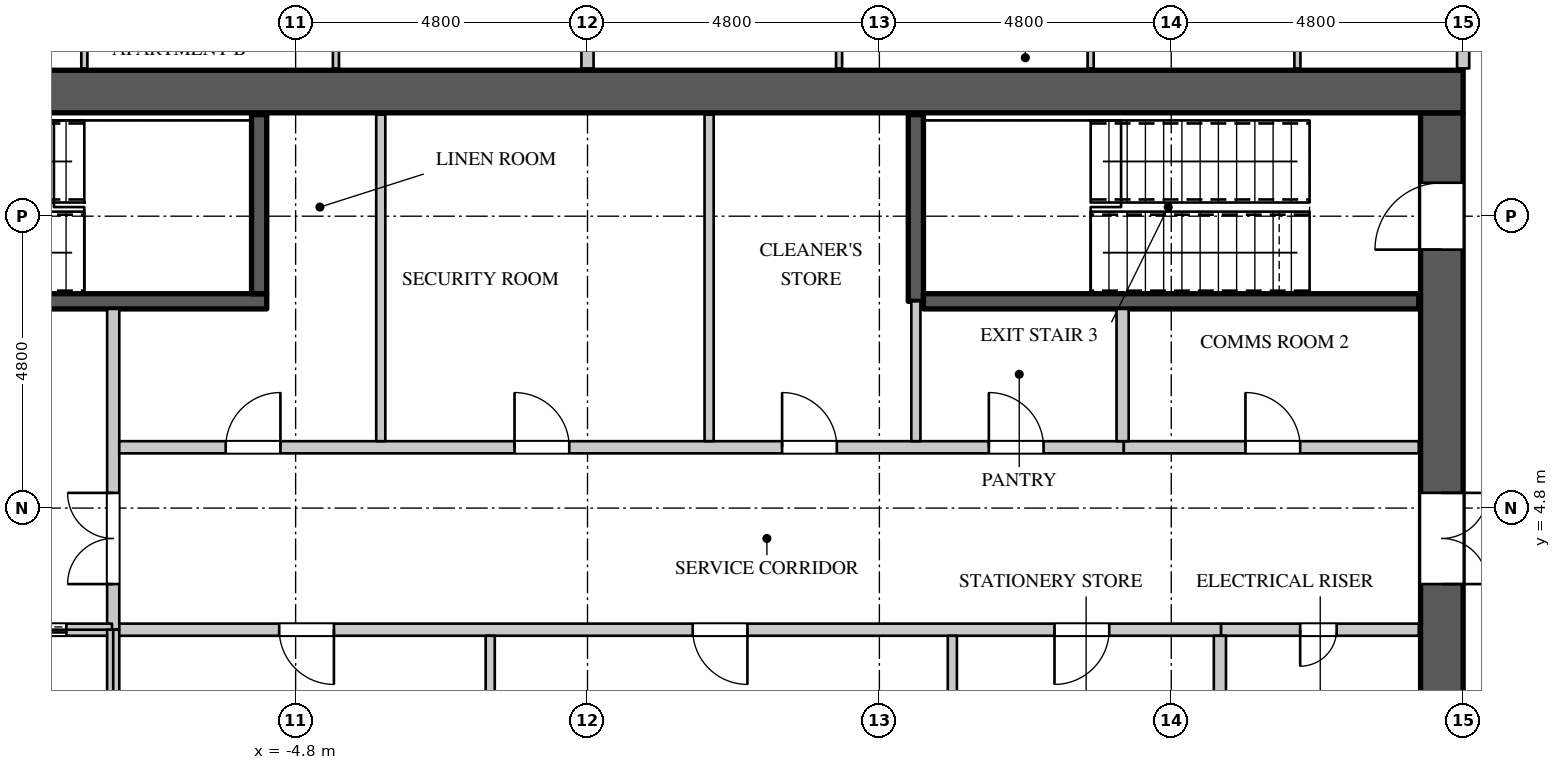
"""IFC4 building model, lengths in metres.
Left out: names, types, materials, properties, quantities, classifications, styles, units other than length and angle.
Written with IfcOpenShell. Run it as: python <this file> out.ifc"""

import sys

from ifc_helpers import new_model, si_unit, direction, frame, frame_2d, origin, place, context, subcontext, project, spatial, rectangle, extrude, element, fill, save


model = new_model("IFC4")
c1 = context("Model", 3, precision=1e-05, world=origin(), true_north=direction((0.0, 1.0)))
c2 = subcontext(c1, "Body", "Model", "MODEL_VIEW")
j1 = project(units=[si_unit("LENGTHUNIT", "METRE"), si_unit("PLANEANGLEUNIT", "RADIAN")], contexts=[c1])
p1 = place(None, origin())
s1 = spatial("IfcSite", under=j1, at=p1, CompositionType="ELEMENT")
p2 = place(p1, origin())
s2 = spatial("IfcBuilding", under=s1, at=p2, CompositionType="ELEMENT")
p3 = place(p2, frame((0.0, 0.0, 162.3)))
s3 = spatial("IfcBuildingStorey", under=s2, at=p3, CompositionType="ELEMENT", Elevation=162.3)
p4 = place(p3, frame((-14.4, 11.65, 0.0), z_axis=(0.0, 0.0, 1.0), x_axis=(1.0, 0.0, 0.0)))
e1 = element("IfcWall", 1, at=p4, inside=s3, PredefinedType="SHEAR", context=c2, shape_type="SweptSolid", body=[
    extrude(rectangle(XDim=28.8, YDim=0.7, at=frame_2d((14.4, 0.0))), origin(), (0.0, 0.0, 1.0), 4.2),
])
p5 = place(p3, frame((14.05, -11.3, 0.0), z_axis=(0.0, 0.0, 1.0), x_axis=(0.0, 1.0, 0.0)))
e2 = element("IfcWall", 2, at=p5, inside=s3, PredefinedType="SHEAR", context=c2, shape_type="SweptSolid", body=[
    extrude(rectangle(XDim=22.6, YDim=0.7, at=frame_2d((11.3, 0.0))), origin(), (0.0, 0.0, 1.0), 4.2),
])
p6 = place(p5, frame((20.35, 0.0, 0.0)))
e3 = element("IfcOpeningElement", 3, at=p6, cuts=e2, PredefinedType="OPENING", context=c2, shape_type="SweptSolid", body=[
    extrude(rectangle(XDim=1.1, YDim=2.2, at=frame_2d((0.55, 1.1))), frame((0.0, 0.36, 0.0), z_axis=(0.0, -1.0, 0.0), x_axis=(1.0, 0.0, 0.0)), (0.0, 0.0, 1.0), 0.72),
])
p7 = place(p5, frame((1.15, 0.0, 0.0)))
e4 = element("IfcOpeningElement", 4, at=p7, cuts=e2, PredefinedType="OPENING", context=c2, shape_type="SweptSolid", body=[
    extrude(rectangle(XDim=1.1, YDim=2.2, at=frame_2d((0.55, 1.1))), frame((0.0, 0.36, 0.0), z_axis=(0.0, -1.0, 0.0), x_axis=(1.0, 0.0, 0.0)), (0.0, 0.0, 1.0), 0.72),
])
p8 = place(p5, frame((14.85, 0.0, 0.0)))
e5 = element("IfcOpeningElement", 5, at=p8, cuts=e2, PredefinedType="OPENING", context=c2, shape_type="SweptSolid", body=[
    extrude(rectangle(XDim=1.5, YDim=2.4, at=frame_2d((0.75, 1.2))), frame((0.0, 0.36, 0.0), z_axis=(0.0, -1.0, 0.0), x_axis=(1.0, 0.0, 0.0)), (0.0, 0.0, 1.0), 0.72),
])
p9 = place(p5, frame((6.25, 0.0, 0.0)))
e6 = element("IfcOpeningElement", 6, at=p9, cuts=e2, PredefinedType="OPENING", context=c2, shape_type="SweptSolid", body=[
    extrude(rectangle(XDim=1.5, YDim=2.4, at=frame_2d((0.75, 1.2))), frame((0.0, 0.36, 0.0), z_axis=(0.0, -1.0, 0.0), x_axis=(1.0, 0.0, 0.0)), (0.0, 0.0, 1.0), 0.72),
])
p10 = place(p3, frame((-7.82, 2.8, 0.0), z_axis=(0.0, 0.0, 1.0), x_axis=(1.0, 0.0, 0.0)))
e7 = element("IfcWall", 7, at=p10, inside=s3, PredefinedType="PARTITIONING", context=c2, shape_type="SweptSolid", body=[
    extrude(rectangle(XDim=18.24, YDim=0.2, at=frame_2d((9.12, 0.0))), origin(), (0.0, 0.0, 1.0), 3.95),
])
p11 = place(p10, frame((2.75, 0.0, 0.0)))
e8 = element("IfcOpeningElement", 8, at=p11, cuts=e7, PredefinedType="OPENING", context=c2, shape_type="SweptSolid", body=[
    extrude(rectangle(XDim=0.9, YDim=2.2, at=frame_2d((0.45, 1.1))), frame((0.0, 0.11, 0.0), z_axis=(0.0, -1.0, 0.0), x_axis=(1.0, 0.0, 0.0)), (0.0, 0.0, 1.0), 0.22),
])
p12 = place(p10, frame((9.55, 0.0, 0.0)))
e9 = element("IfcOpeningElement", 9, at=p12, cuts=e7, PredefinedType="OPENING", context=c2, shape_type="SweptSolid", body=[
    extrude(rectangle(XDim=0.9, YDim=2.2, at=frame_2d((0.45, 1.1))), frame((0.0, 0.11, 0.0), z_axis=(0.0, -1.0, 0.0), x_axis=(1.0, 0.0, 0.0)), (0.0, 0.0, 1.0), 0.22),
])
p13 = place(p10, frame((15.5, 0.0, 0.0)))
e10 = element("IfcOpeningElement", 10, at=p13, cuts=e7, PredefinedType="OPENING", context=c2, shape_type="SweptSolid", body=[
    extrude(rectangle(XDim=0.9, YDim=2.2, at=frame_2d((0.45, 1.1))), frame((0.0, 0.11, 0.0), z_axis=(0.0, -1.0, 0.0), x_axis=(1.0, 0.0, 0.0)), (0.0, 0.0, 1.0), 0.22),
])
p14 = place(p3, frame((-7.8, 2.8, 0.0), z_axis=(0.0, 0.0, 1.0), x_axis=(0.0, 1.0, 0.0)))
e11 = element("IfcWall", 11, at=p14, inside=s3, PredefinedType="PARTITIONING", context=c2, shape_type="SweptSolid", body=[
    extrude(rectangle(XDim=5.275, YDim=0.2, at=frame_2d((2.637, 0.0))), origin(), (0.0, 0.0, 1.0), 3.95),
])
p15 = place(p14, frame((0.75, 0.0, 0.0)))
e12 = element("IfcOpeningElement", 12, at=p15, cuts=e11, PredefinedType="OPENING", context=c2, shape_type="SweptSolid", body=[
    extrude(rectangle(XDim=1.5, YDim=2.4, at=frame_2d((0.75, 1.2))), frame((0.0, 0.11, 0.0), z_axis=(0.0, -1.0, 0.0), x_axis=(1.0, 0.0, 0.0)), (0.0, 0.0, 1.0), 0.22),
])
p16 = place(p3, frame((-7.7, 5.8, 0.0), z_axis=(0.0, 0.0, 1.0), x_axis=(1.0, 0.0, 0.0)))
e13 = element("IfcWall", 13, at=p16, inside=s3, PredefinedType="PARTITIONING", context=c2, shape_type="SweptSolid", body=[
    extrude(rectangle(XDim=16.52, YDim=0.2, at=frame_2d((8.26, 0.0))), origin(), (0.0, 0.0, 1.0), 3.95),
])
p17 = place(p16, frame((1.75, 0.0, 0.0)))
e14 = element("IfcOpeningElement", 14, at=p17, cuts=e13, PredefinedType="OPENING", context=c2, shape_type="SweptSolid", body=[
    extrude(rectangle(XDim=0.9, YDim=2.2, at=frame_2d((0.45, 1.1))), frame((0.0, 0.11, 0.0), z_axis=(0.0, -1.0, 0.0), x_axis=(1.0, 0.0, 0.0)), (0.0, 0.0, 1.0), 0.22),
])
p18 = place(p16, frame((6.5, 0.0, 0.0)))
e15 = element("IfcOpeningElement", 15, at=p18, cuts=e13, PredefinedType="OPENING", context=c2, shape_type="SweptSolid", body=[
    extrude(rectangle(XDim=0.9, YDim=2.2, at=frame_2d((0.45, 1.1))), frame((0.0, 0.11, 0.0), z_axis=(0.0, -1.0, 0.0), x_axis=(1.0, 0.0, 0.0)), (0.0, 0.0, 1.0), 0.22),
])
p19 = place(p16, frame((10.9, 0.0, 0.0)))
e16 = element("IfcOpeningElement", 16, at=p19, cuts=e13, PredefinedType="OPENING", context=c2, shape_type="SweptSolid", body=[
    extrude(rectangle(XDim=0.9, YDim=2.2, at=frame_2d((0.45, 1.1))), frame((0.0, 0.11, 0.0), z_axis=(0.0, -1.0, 0.0), x_axis=(1.0, 0.0, 0.0)), (0.0, 0.0, 1.0), 0.22),
])
p20 = place(p16, frame((14.3, 0.0, 0.0)))
e17 = element("IfcOpeningElement", 17, at=p20, cuts=e13, PredefinedType="OPENING", context=c2, shape_type="SweptSolid", body=[
    extrude(rectangle(XDim=0.9, YDim=2.2, at=frame_2d((0.45, 1.1))), frame((0.0, 0.11, 0.0), z_axis=(0.0, -1.0, 0.0), x_axis=(1.0, 0.0, 0.0)), (0.0, 0.0, 1.0), 0.22),
])
p21 = place(p3, frame((14.4, 12.03, 0.0), z_axis=(0.0, 0.0, 1.0), x_axis=(0.0, 1.0, 0.0)))
e18 = element("IfcWall", 18, at=p21, inside=s3, PredefinedType="PARTITIONING", context=c2, shape_type="SweptSolid", body=[
    extrude(rectangle(XDim=2.27, YDim=0.2, at=frame_2d((1.135, 0.0))), origin(), (0.0, 0.0, 1.0), 3.95),
])
p22 = place(p3, frame((-3.4, 5.9, 0.0), z_axis=(0.0, 0.0, 1.0), x_axis=(0.0, 1.0, 0.0)))
e19 = element("IfcWall", 19, at=p22, inside=s3, PredefinedType="PARTITIONING", context=c2, shape_type="SweptSolid", body=[
    extrude(rectangle(XDim=5.37, YDim=0.15, at=frame_2d((2.685, 0.0))), origin(), (0.0, 0.0, 1.0), 3.95),
])
p23 = place(p3, frame((-1.6, 0.1, 0.0), z_axis=(0.0, 0.0, 1.0), x_axis=(0.0, 1.0, 0.0)))
e20 = element("IfcWall", 20, at=p23, inside=s3, PredefinedType="PARTITIONING", context=c2, shape_type="SweptSolid", body=[
    extrude(rectangle(XDim=2.6, YDim=0.15, at=frame_2d((1.3, 0.0))), origin(), (0.0, 0.0, 1.0), 3.95),
])
p24 = place(p3, frame((2.0, 5.9, 0.0), z_axis=(0.0, 0.0, 1.0), x_axis=(0.0, 1.0, 0.0)))
e21 = element("IfcWall", 21, at=p24, inside=s3, PredefinedType="PARTITIONING", context=c2, shape_type="SweptSolid", body=[
    extrude(rectangle(XDim=5.37, YDim=0.15, at=frame_2d((2.685, 0.0))), origin(), (0.0, 0.0, 1.0), 3.95),
])
p25 = place(p3, frame((5.4, 5.9, 0.0), z_axis=(0.0, 0.0, 1.0), x_axis=(0.0, 1.0, 0.0)))
e22 = element("IfcWall", 22, at=p25, inside=s3, PredefinedType="PARTITIONING", context=c2, shape_type="SweptSolid", body=[
    extrude(rectangle(XDim=2.3, YDim=0.15, at=frame_2d((1.15, 0.0))), origin(), (0.0, 0.0, 1.0), 3.95),
])
p26 = place(p3, frame((6.0, 0.1, 0.0), z_axis=(0.0, 0.0, 1.0), x_axis=(0.0, 1.0, 0.0)))
e23 = element("IfcWall", 23, at=p26, inside=s3, PredefinedType="PARTITIONING", context=c2, shape_type="SweptSolid", body=[
    extrude(rectangle(XDim=2.6, YDim=0.15, at=frame_2d((1.3, 0.0))), origin(), (0.0, 0.0, 1.0), 3.95),
])
p27 = place(p3, frame((0.0, 12.03, 0.0), z_axis=(0.0, 0.0, 1.0), x_axis=(0.0, 1.0, 0.0)))
e24 = element("IfcWall", 24, at=p27, inside=s3, PredefinedType="PARTITIONING", context=c2, shape_type="SweptSolid", body=[
    extrude(rectangle(XDim=12.025, YDim=0.2, at=frame_2d((6.012, 0.0))), origin(), (0.0, 0.0, 1.0), 3.95),
])
p28 = place(p3, frame((8.82, 5.8, 0.0), z_axis=(0.0, 0.0, 1.0), x_axis=(1.0, 0.0, 0.0)))
e25 = element("IfcWall", 25, at=p28, inside=s3, PredefinedType="PARTITIONING", context=c2, shape_type="SweptSolid", body=[
    extrude(rectangle(XDim=4.85, YDim=0.2, at=frame_2d((2.425, 0.0))), origin(), (0.0, 0.0, 1.0), 3.95),
])
p29 = place(p28, frame((2.0, 0.0, 0.0)))
e26 = element("IfcOpeningElement", 26, at=p29, cuts=e25, PredefinedType="OPENING", context=c2, shape_type="SweptSolid", body=[
    extrude(rectangle(XDim=0.9, YDim=2.2, at=frame_2d((0.45, 1.1))), frame((0.0, 0.11, 0.0), z_axis=(0.0, -1.0, 0.0), x_axis=(1.0, 0.0, 0.0)), (0.0, 0.0, 1.0), 0.22),
])
p30 = place(p3, frame((8.8, 5.9, 0.0), z_axis=(0.0, 0.0, 1.0), x_axis=(0.0, 1.0, 0.0)))
e27 = element("IfcWall", 27, at=p30, inside=s3, PredefinedType="PARTITIONING", context=c2, shape_type="SweptSolid", body=[
    extrude(rectangle(XDim=2.175, YDim=0.2, at=frame_2d((1.087, 0.0))), origin(), (0.0, 0.0, 1.0), 3.95),
])
p31 = place(p3, frame((10.42, 2.8, 0.0), z_axis=(0.0, 0.0, 1.0), x_axis=(1.0, 0.0, 0.0)))
e28 = element("IfcWall", 28, at=p31, inside=s3, PredefinedType="PARTITIONING", context=c2, shape_type="SweptSolid", body=[
    extrude(rectangle(XDim=3.25, YDim=0.2, at=frame_2d((1.625, 0.0))), origin(), (0.0, 0.0, 1.0), 3.95),
])
p32 = place(p31, frame((1.3, 0.0, 0.0)))
e29 = element("IfcOpeningElement", 29, at=p32, cuts=e28, PredefinedType="OPENING", context=c2, shape_type="SweptSolid", body=[
    extrude(rectangle(XDim=0.6, YDim=2.0, at=frame_2d((0.3, 1.0))), frame((0.0, 0.11, 0.0), z_axis=(0.0, -1.0, 0.0), x_axis=(1.0, 0.0, 0.0)), (0.0, 0.0, 1.0), 0.22),
])
p33 = place(p3, frame((10.4, 0.1, 0.0), z_axis=(0.0, 0.0, 1.0), x_axis=(0.0, 1.0, 0.0)))
e30 = element("IfcWall", 30, at=p33, inside=s3, PredefinedType="PARTITIONING", context=c2, shape_type="SweptSolid", body=[
    extrude(rectangle(XDim=2.6, YDim=0.2, at=frame_2d((1.3, 0.0))), origin(), (0.0, 0.0, 1.0), 3.95),
])
p34 = place(p3, frame((-13.67, 2.8, 0.0), z_axis=(0.0, 0.0, 1.0), x_axis=(1.0, 0.0, 0.0)))
e31 = element("IfcWall", 31, at=p34, inside=s3, PredefinedType="PARTITIONING", context=c2, shape_type="SweptSolid", body=[
    extrude(rectangle(XDim=5.85, YDim=0.2, at=frame_2d((2.925, 0.0))), origin(), (0.0, 0.0, 1.0), 3.95),
])
p35 = place(p34, frame((1.05, 0.0, 0.0)))
e32 = element("IfcOpeningElement", 32, at=p35, cuts=e31, PredefinedType="OPENING", context=c2, shape_type="SweptSolid", body=[
    extrude(rectangle(XDim=1.1, YDim=2.2, at=frame_2d((0.55, 1.1))), frame((0.0, 0.11, 0.0), z_axis=(0.0, -1.0, 0.0), x_axis=(1.0, 0.0, 0.0)), (0.0, 0.0, 1.0), 0.22),
])
p36 = place(p34, frame((4.0, 0.0, 0.0)))
e33 = element("IfcOpeningElement", 33, at=p36, cuts=e31, PredefinedType="OPENING", context=c2, shape_type="SweptSolid", body=[
    extrude(rectangle(XDim=1.1, YDim=2.2, at=frame_2d((0.55, 1.1))), frame((0.0, 0.11, 0.0), z_axis=(0.0, -1.0, 0.0), x_axis=(1.0, 0.0, 0.0)), (0.0, 0.0, 1.0), 0.22),
])
p37 = place(p3, frame((-7.8, 0.0, 0.0), z_axis=(0.0, 0.0, 1.0), x_axis=(0.0, 1.0, 0.0)))
e34 = element("IfcWall", 34, at=p37, inside=s3, PredefinedType="PARTITIONING", context=c2, shape_type="SweptSolid", body=[
    extrude(rectangle(XDim=2.8, YDim=0.2, at=frame_2d((1.4, 0.0))), origin(), (0.0, 0.0, 1.0), 3.95),
])
p38 = place(p3, frame((-13.67, 8.2, 0.0), z_axis=(0.0, 0.0, 1.0), x_axis=(1.0, 0.0, 0.0)))
e35 = element("IfcWall", 35, at=p38, inside=s3, PredefinedType="SHEAR", context=c2, shape_type="SweptSolid", body=[
    extrude(rectangle(XDim=8.395, YDim=0.25, at=frame_2d((4.198, 0.0))), origin(), (0.0, 0.0, 1.0), 3.95),
])
p39 = place(p38, frame((0.15, 0.0, 0.0)))
e36 = element("IfcOpeningElement", 36, at=p39, cuts=e35, PredefinedType="OPENING", context=c2, shape_type="SweptSolid", body=[
    extrude(rectangle(XDim=1.1, YDim=2.2, at=frame_2d((0.55, 1.1))), frame((0.0, 0.135, 0.0), z_axis=(0.0, -1.0, 0.0), x_axis=(1.0, 0.0, 0.0)), (0.0, 0.0, 1.0), 0.27),
])
p40 = place(p3, frame((-5.4, 8.325, 0.0), z_axis=(0.0, 0.0, 1.0), x_axis=(0.0, 1.0, 0.0)))
e37 = element("IfcWall", 37, at=p40, inside=s3, PredefinedType="SHEAR", context=c2, shape_type="SweptSolid", body=[
    extrude(rectangle(XDim=2.945, YDim=0.25, at=frame_2d((1.473, 0.0))), origin(), (0.0, 0.0, 1.0), 3.95),
])
p41 = place(p3, frame((5.4, 8.2, 0.0), z_axis=(0.0, 0.0, 1.0), x_axis=(0.0, 1.0, 0.0)))
e38 = element("IfcWall", 38, at=p41, inside=s3, PredefinedType="SHEAR", context=c2, shape_type="SweptSolid", body=[
    extrude(rectangle(XDim=3.07, YDim=0.25, at=frame_2d((1.535, 0.0))), origin(), (0.0, 0.0, 1.0), 3.95),
])
p42 = place(p3, frame((5.525, 8.2, 0.0), z_axis=(0.0, 0.0, 1.0), x_axis=(1.0, 0.0, 0.0)))
e39 = element("IfcWall", 39, at=p42, inside=s3, PredefinedType="SHEAR", context=c2, shape_type="SweptSolid", body=[
    extrude(rectangle(XDim=8.145, YDim=0.25, at=frame_2d((4.073, 0.0))), origin(), (0.0, 0.0, 1.0), 3.95),
])
p43 = place(p3, frame((-8.274, 12.03, 0.0), z_axis=(0.0, 0.0, 1.0), x_axis=(0.0, 1.0, 0.0)))
e40 = element("IfcWall", 40, at=p43, inside=s3, PredefinedType="PARTITIONING", context=c2, shape_type="SweptSolid", body=[
    extrude(rectangle(XDim=2.95, YDim=0.1, at=frame_2d((1.475, 0.0))), origin(), (0.0, 0.0, 1.0), 3.95),
])
for number, where, z_axis, x_axis in (
    (41, (-4.137, 12.03, 0.0), (0.0, 0.0, 1.0), (0.0, 1.0, 0.0)),
    (42, (4.137, 12.03, 0.0), (0.0, 0.0, 1.0), (0.0, 1.0, 0.0)),
):
    element("IfcWall", number, at=place(p3, frame(where, z_axis=z_axis, x_axis=x_axis)), inside=s3, PredefinedType="PARTITIONING", context=c2, shape_type="SweptSolid", body=[
        extrude(rectangle(XDim=5.295, YDim=0.1, at=frame_2d((2.647, 0.0))), origin(), (0.0, 0.0, 1.0), 3.35),
    ])
p44 = place(p3, frame((8.274, 12.03, 0.0), z_axis=(0.0, 0.0, 1.0), x_axis=(0.0, 1.0, 0.0)))
e43 = element("IfcWall", 43, at=p44, inside=s3, PredefinedType="PARTITIONING", context=c2, shape_type="SweptSolid", body=[
    extrude(rectangle(XDim=2.95, YDim=0.1, at=frame_2d((1.475, 0.0))), origin(), (0.0, 0.0, 1.0), 3.95),
])
p45 = place(p3, frame((11.675, 12.03, 0.0), z_axis=(0.0, 0.0, 1.0), x_axis=(0.0, 1.0, 0.0)))
e44 = element("IfcWall", 44, at=p45, inside=s3, PredefinedType="PARTITIONING", context=c2, shape_type="SweptSolid", body=[
    extrude(rectangle(XDim=2.895, YDim=0.1, at=frame_2d((1.448, 0.0))), origin(), (0.0, 0.0, 1.0), 3.95),
])
p46 = place(p45, frame((0.95, 0.0, 0.0)))
e45 = element("IfcOpeningElement", 45, at=p46, cuts=e44, PredefinedType="OPENING", context=c2, shape_type="SweptSolid", body=[
    extrude(rectangle(XDim=0.9, YDim=2.2, at=frame_2d((0.45, 1.1))), frame((0.0, 0.06, 0.0), z_axis=(0.0, -1.0, 0.0), x_axis=(1.0, 0.0, 0.0)), (0.0, 0.0, 1.0), 0.12),
])
p47 = place(p32, origin())
e46 = element("IfcDoor", 46, at=p47, inside=s3, OperationType="SINGLE_SWING_RIGHT", PredefinedType="DOOR", context=c2, shape_type="SweptSolid", body=[
    extrude(rectangle(XDim=0.6, YDim=2.0, at=frame_2d((0.3, 1.0))), frame((0.0, 0.025, 0.0), z_axis=(0.0, -1.0, 0.0), x_axis=(1.0, 0.0, 0.0)), (0.0, 0.0, 1.0), 0.05),
])
fill(e29, e46)
p48 = place(p17, origin())
e47 = element("IfcDoor", 47, at=p48, inside=s3, OperationType="SINGLE_SWING_RIGHT", PredefinedType="DOOR", context=c2, shape_type="SweptSolid", body=[
    extrude(rectangle(XDim=0.9, YDim=2.2, at=frame_2d((0.45, 1.1))), frame((0.0, 0.025, 0.0), z_axis=(0.0, -1.0, 0.0), x_axis=(1.0, 0.0, 0.0)), (0.0, 0.0, 1.0), 0.05),
])
fill(e14, e47)
p49 = place(p18, origin())
e48 = element("IfcDoor", 48, at=p49, inside=s3, OperationType="SINGLE_SWING_LEFT", PredefinedType="DOOR", context=c2, shape_type="SweptSolid", body=[
    extrude(rectangle(XDim=0.9, YDim=2.2, at=frame_2d((0.45, 1.1))), frame((0.0, 0.025, 0.0), z_axis=(0.0, -1.0, 0.0), x_axis=(1.0, 0.0, 0.0)), (0.0, 0.0, 1.0), 0.05),
])
fill(e15, e48)
p50 = place(p19, origin())
e49 = element("IfcDoor", 49, at=p50, inside=s3, OperationType="SINGLE_SWING_LEFT", PredefinedType="DOOR", context=c2, shape_type="SweptSolid", body=[
    extrude(rectangle(XDim=0.9, YDim=2.2, at=frame_2d((0.45, 1.1))), frame((0.0, 0.025, 0.0), z_axis=(0.0, -1.0, 0.0), x_axis=(1.0, 0.0, 0.0)), (0.0, 0.0, 1.0), 0.05),
])
fill(e16, e49)
p51 = place(p20, origin())
e50 = element("IfcDoor", 50, at=p51, inside=s3, OperationType="SINGLE_SWING_LEFT", PredefinedType="DOOR", context=c2, shape_type="SweptSolid", body=[
    extrude(rectangle(XDim=0.9, YDim=2.2, at=frame_2d((0.45, 1.1))), frame((0.0, 0.025, 0.0), z_axis=(0.0, -1.0, 0.0), x_axis=(1.0, 0.0, 0.0)), (0.0, 0.0, 1.0), 0.05),
])
fill(e17, e50)
p52 = place(p29, origin())
e51 = element("IfcDoor", 51, at=p52, inside=s3, OperationType="SINGLE_SWING_LEFT", PredefinedType="DOOR", context=c2, shape_type="SweptSolid", body=[
    extrude(rectangle(XDim=0.9, YDim=2.2, at=frame_2d((0.45, 1.1))), frame((0.0, 0.025, 0.0), z_axis=(0.0, -1.0, 0.0), x_axis=(1.0, 0.0, 0.0)), (0.0, 0.0, 1.0), 0.05),
])
fill(e26, e51)
p53 = place(p11, origin())
e52 = element("IfcDoor", 52, at=p53, inside=s3, OperationType="SINGLE_SWING_LEFT", PredefinedType="DOOR", context=c2, shape_type="SweptSolid", body=[
    extrude(rectangle(XDim=0.9, YDim=2.2, at=frame_2d((0.45, 1.1))), frame((0.0, 0.025, 0.0), z_axis=(0.0, -1.0, 0.0), x_axis=(1.0, 0.0, 0.0)), (0.0, 0.0, 1.0), 0.05),
])
fill(e8, e52)
p54 = place(p12, origin())
e53 = element("IfcDoor", 53, at=p54, inside=s3, OperationType="SINGLE_SWING_LEFT", PredefinedType="DOOR", context=c2, shape_type="SweptSolid", body=[
    extrude(rectangle(XDim=0.9, YDim=2.2, at=frame_2d((0.45, 1.1))), frame((0.0, 0.025, 0.0), z_axis=(0.0, -1.0, 0.0), x_axis=(1.0, 0.0, 0.0)), (0.0, 0.0, 1.0), 0.05),
])
fill(e9, e53)
p55 = place(p13, origin())
e54 = element("IfcDoor", 54, at=p55, inside=s3, OperationType="SINGLE_SWING_RIGHT", PredefinedType="DOOR", context=c2, shape_type="SweptSolid", body=[
    extrude(rectangle(XDim=0.9, YDim=2.2, at=frame_2d((0.45, 1.1))), frame((0.0, 0.025, 0.0), z_axis=(0.0, -1.0, 0.0), x_axis=(1.0, 0.0, 0.0)), (0.0, 0.0, 1.0), 0.05),
])
fill(e10, e54)
p56 = place(p36, origin())
e55 = element("IfcDoor", 55, at=p56, inside=s3, OperationType="DOUBLE_DOOR_SLIDING", PredefinedType="DOOR", context=c2, shape_type="SweptSolid", body=[
    extrude(rectangle(XDim=1.1, YDim=2.2, at=frame_2d((0.55, 1.1))), frame((0.0, 0.025, 0.0), z_axis=(0.0, -1.0, 0.0), x_axis=(1.0, 0.0, 0.0)), (0.0, 0.0, 1.0), 0.05),
])
fill(e33, e55)
p57 = place(p15, origin())
e56 = element("IfcDoor", 56, at=p57, inside=s3, OperationType="DOUBLE_DOOR_SINGLE_SWING", PredefinedType="DOOR", context=c2, shape_type="SweptSolid", body=[
    extrude(rectangle(XDim=1.5, YDim=2.4, at=frame_2d((0.75, 1.2))), frame((0.0, 0.025, 0.0), z_axis=(0.0, -1.0, 0.0), x_axis=(1.0, 0.0, 0.0)), (0.0, 0.0, 1.0), 0.05),
])
fill(e12, e56)
p58 = place(p6, origin())
e57 = element("IfcDoor", 57, at=p58, inside=s3, OperationType="SINGLE_SWING_LEFT", PredefinedType="DOOR", context=c2, shape_type="SweptSolid", body=[
    extrude(rectangle(XDim=1.1, YDim=2.2, at=frame_2d((0.55, 1.1))), frame((0.0, 0.345, 0.0), z_axis=(0.0, -1.0, 0.0), x_axis=(1.0, 0.0, 0.0)), (0.0, 0.0, 1.0), 0.05),
])
fill(e3, e57)
p59 = place(p8, origin())
e58 = element("IfcDoor", 58, at=p59, inside=s3, OperationType="DOUBLE_DOOR_SINGLE_SWING", PredefinedType="DOOR", context=c2, shape_type="SweptSolid", body=[
    extrude(rectangle(XDim=1.5, YDim=2.4, at=frame_2d((0.75, 1.2))), frame((0.0, -0.295, 0.0), z_axis=(0.0, -1.0, 0.0), x_axis=(1.0, 0.0, 0.0)), (0.0, 0.0, 1.0), 0.05),
])
fill(e5, e58)
save(model, sys.argv[1])
